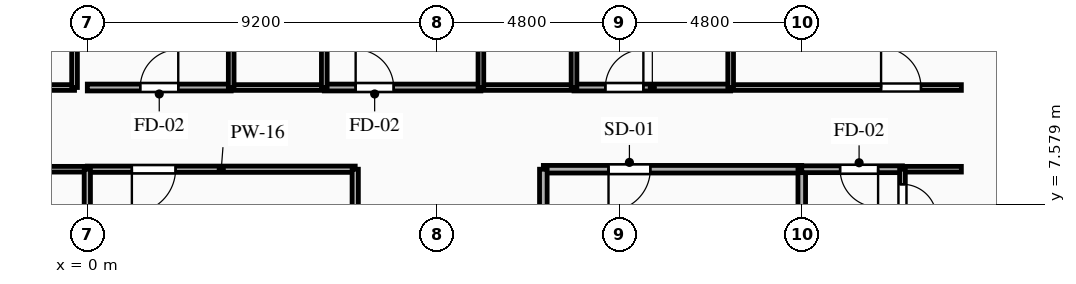
"""IFC4 building model, lengths in metres.
Left out: names, types, materials, properties, quantities, classifications, styles, units other than length and angle.
Written with IfcOpenShell. Run it as: python <this file> out.ifc"""

import sys

from ifc_helpers import new_model, si_unit, direction, frame, frame_2d, origin, place, context, subcontext, project, spatial, rectangle, extrude, element, fill, save


model = new_model("IFC4")
c1 = context("Model", 3, precision=1e-05, world=origin(), true_north=direction((0.0, 1.0)))
c2 = subcontext(c1, "Body", "Model", "MODEL_VIEW")
j1 = project(units=[si_unit("LENGTHUNIT", "METRE"), si_unit("PLANEANGLEUNIT", "RADIAN")], contexts=[c1])
p1 = place(None, origin())
s1 = spatial("IfcSite", under=j1, at=p1, CompositionType="ELEMENT")
p2 = place(p1, origin())
s2 = spatial("IfcBuilding", under=s1, at=p2, CompositionType="ELEMENT")
p3 = place(p2, frame((0.0, 0.0, 30.35)))
s3 = spatial("IfcBuildingStorey", under=s2, at=p3, CompositionType="ELEMENT", Elevation=30.35)
p4 = place(p3, frame((18.8, 8.5, 0.0), z_axis=(0.0, 0.0, 1.0), x_axis=(-1.0, 0.0, 0.0)))
e1 = element("IfcWall", 1, at=p4, inside=s3, PredefinedType="PARTITIONING", context=c2, shape_type="SweptSolid", body=[
    extrude(rectangle(XDim=6.8, YDim=0.2, at=frame_2d((3.4, 0.0))), origin(), (0.0, 0.0, 1.0), 3.035),
])
p5 = place(p4, frame((3.985, 0.0, 0.0)))
e2 = element("IfcOpeningElement", 2, at=p5, cuts=e1, PredefinedType="OPENING", context=c2, shape_type="SweptSolid", body=[
    extrude(rectangle(XDim=1.1, YDim=2.15, at=frame_2d((0.55, 1.075))), frame((0.0, 0.11, 0.0), z_axis=(0.0, -1.0, 0.0), x_axis=(1.0, 0.0, 0.0)), (0.0, 0.0, 1.0), 0.22),
])
p6 = place(p3, frame((12.0, 8.5, 0.0), z_axis=(0.0, 0.0, 1.0), x_axis=(0.0, -1.0, 0.0)))
e3 = element("IfcWall", 3, at=p6, inside=s3, PredefinedType="PARTITIONING", context=c2, shape_type="SweptSolid", body=[
    extrude(rectangle(XDim=2.9, YDim=0.2, at=frame_2d((1.45, 0.0))), origin(), (0.0, 0.0, 1.0), 3.035),
])
p7 = place(p3, frame((18.8, 5.6, 0.0), z_axis=(0.0, 0.0, 1.0), x_axis=(0.0, 1.0, 0.0)))
e4 = element("IfcWall", 4, at=p7, inside=s3, PredefinedType="PARTITIONING", context=c2, shape_type="SweptSolid", body=[
    extrude(rectangle(XDim=2.9, YDim=0.2, at=frame_2d((1.45, 0.0))), origin(), (0.0, 0.0, 1.0), 2.52),
])
p8 = place(p3, frame((-2.786, 10.65, 0.0), z_axis=(0.0, 0.0, 1.0), x_axis=(1.0, 0.0, 0.0)))
e5 = element("IfcWall", 5, at=p8, inside=s3, PredefinedType="PLUMBINGWALL", context=c2, shape_type="SweptSolid", body=[
    extrude(rectangle(XDim=2.45, YDim=0.15, at=frame_2d((1.225, 0.0))), origin(), (0.0, 0.0, 1.0), 3.035),
])
p9 = place(p3, frame((0.0, 8.5, 0.0), z_axis=(0.0, 0.0, 1.0), x_axis=(-1.0, 0.0, 0.0)))
e6 = element("IfcWall", 6, at=p9, inside=s3, PredefinedType="PARTITIONING", context=c2, shape_type="SweptSolid", body=[
    extrude(rectangle(XDim=7.05, YDim=0.15, at=frame_2d((3.525, 0.0))), origin(), (0.0, 0.0, 1.0), 3.035),
])
p10 = place(p3, frame((21.45, 8.5, 0.0), z_axis=(0.0, 0.0, 1.0), x_axis=(-1.0, 0.0, 0.0)))
e7 = element("IfcWall", 7, at=p10, inside=s3, PredefinedType="PARTITIONING", context=c2, shape_type="SweptSolid", body=[
    extrude(rectangle(XDim=2.65, YDim=0.18, at=frame_2d((1.325, 0.0))), origin(), (0.0, 0.0, 1.0), 3.035),
])
p11 = place(p10, frame((0.641, 0.0, 0.0)))
e8 = element("IfcOpeningElement", 8, at=p11, cuts=e7, PredefinedType="OPENING", context=c2, shape_type="SweptSolid", body=[
    extrude(rectangle(XDim=1.0, YDim=2.15, at=frame_2d((0.5, 1.075))), frame((0.0, 0.1, 0.0), z_axis=(0.0, -1.0, 0.0), x_axis=(1.0, 0.0, 0.0)), (0.0, 0.0, 1.0), 0.2),
])
p12 = place(p3, frame((23.0, 8.5, 0.0), z_axis=(0.0, 0.0, 1.0), x_axis=(-1.0, 0.0, 0.0)))
e9 = element("IfcWall", 9, at=p12, inside=s3, PredefinedType="PARTITIONING", context=c2, shape_type="SweptSolid", body=[
    extrude(rectangle(XDim=1.55, YDim=0.15, at=frame_2d((0.775, 0.0))), origin(), (0.0, 0.0, 1.0), 3.035),
])
p13 = place(p3, frame((0.0, 10.65, 0.0), z_axis=(0.0, 0.0, 1.0), x_axis=(1.0, 0.0, 0.0)))
e10 = element("IfcWall", 10, at=p13, inside=s3, PredefinedType="PARTITIONING", context=c2, shape_type="SweptSolid", body=[
    extrude(rectangle(XDim=3.786, YDim=0.18, at=frame_2d((1.893, 0.0))), origin(), (0.0, 0.0, 1.0), 3.035),
])
p14 = place(p13, frame((1.393, 0.0, 0.0)))
e11 = element("IfcOpeningElement", 11, at=p14, cuts=e10, PredefinedType="OPENING", context=c2, shape_type="SweptSolid", body=[
    extrude(rectangle(XDim=1.0, YDim=2.15, at=frame_2d((0.5, 1.075))), frame((0.0, 0.1, 0.0), z_axis=(0.0, -1.0, 0.0), x_axis=(1.0, 0.0, 0.0)), (0.0, 0.0, 1.0), 0.2),
])
p15 = place(p3, frame((6.236, 10.65, 0.0), z_axis=(0.0, 0.0, 1.0), x_axis=(1.0, 0.0, 0.0)))
e12 = element("IfcWall", 12, at=p15, inside=s3, PredefinedType="PARTITIONING", context=c2, shape_type="SweptSolid", body=[
    extrude(rectangle(XDim=4.121, YDim=0.18, at=frame_2d((2.061, 0.0))), origin(), (0.0, 0.0, 1.0), 3.035),
])
p16 = place(p15, frame((0.825, 0.0, 0.0)))
e13 = element("IfcOpeningElement", 13, at=p16, cuts=e12, PredefinedType="OPENING", context=c2, shape_type="SweptSolid", body=[
    extrude(rectangle(XDim=1.0, YDim=2.15, at=frame_2d((0.5, 1.075))), frame((0.0, 0.1, 0.0), z_axis=(0.0, -1.0, 0.0), x_axis=(1.0, 0.0, 0.0)), (0.0, 0.0, 1.0), 0.2),
])
p17 = place(p3, frame((3.786, 10.65, 0.0), z_axis=(0.0, 0.0, 1.0), x_axis=(1.0, 0.0, 0.0)))
e14 = element("IfcWall", 14, at=p17, inside=s3, PredefinedType="PLUMBINGWALL", context=c2, shape_type="SweptSolid", body=[
    extrude(rectangle(XDim=2.45, YDim=0.15, at=frame_2d((1.225, 0.0))), origin(), (0.0, 0.0, 1.0), 3.035),
])
p18 = place(p3, frame((12.807, 10.65, 0.0), z_axis=(0.0, 0.0, 1.0), x_axis=(1.0, 0.0, 0.0)))
e15 = element("IfcWall", 15, at=p18, inside=s3, PredefinedType="PARTITIONING", context=c2, shape_type="SweptSolid", body=[
    extrude(rectangle(XDim=4.122, YDim=0.18, at=frame_2d((2.061, 0.0))), origin(), (0.0, 0.0, 1.0), 3.035),
])
p19 = place(p18, frame((0.825, 0.0, 0.0)))
e16 = element("IfcOpeningElement", 16, at=p19, cuts=e15, PredefinedType="OPENING", context=c2, shape_type="SweptSolid", body=[
    extrude(rectangle(XDim=1.0, YDim=2.15, at=frame_2d((0.5, 1.075))), frame((0.0, 0.1, 0.0), z_axis=(0.0, -1.0, 0.0), x_axis=(1.0, 0.0, 0.0)), (0.0, 0.0, 1.0), 0.2),
])
p20 = place(p3, frame((10.357, 10.65, 0.0), z_axis=(0.0, 0.0, 1.0), x_axis=(1.0, 0.0, 0.0)))
e17 = element("IfcWall", 17, at=p20, inside=s3, PredefinedType="PLUMBINGWALL", context=c2, shape_type="SweptSolid", body=[
    extrude(rectangle(XDim=2.45, YDim=0.15, at=frame_2d((1.225, 0.0))), origin(), (0.0, 0.0, 1.0), 3.035),
])
p21 = place(p3, frame((16.929, 10.65, 0.0), z_axis=(0.0, 0.0, 1.0), x_axis=(1.0, 0.0, 0.0)))
e18 = element("IfcWall", 18, at=p21, inside=s3, PredefinedType="PARTITIONING", context=c2, shape_type="SweptSolid", body=[
    extrude(rectangle(XDim=6.071, YDim=0.15, at=frame_2d((3.036, 0.0))), origin(), (0.0, 0.0, 1.0), 3.035),
])
p22 = place(p21, frame((3.958, 0.0, 0.0)))
e19 = element("IfcOpeningElement", 19, at=p22, cuts=e18, PredefinedType="OPENING", context=c2, shape_type="SweptSolid", body=[
    extrude(rectangle(XDim=1.05, YDim=2.15, at=frame_2d((0.525, 1.075))), frame((0.0, 0.085, 0.0), z_axis=(0.0, -1.0, 0.0), x_axis=(1.0, 0.0, 0.0)), (0.0, 0.0, 1.0), 0.17),
])
p23 = place(p3, frame((7.05, 8.5, 0.0), z_axis=(0.0, 0.0, 1.0), x_axis=(-1.0, 0.0, 0.0)))
e20 = element("IfcWall", 20, at=p23, inside=s3, PredefinedType="PARTITIONING", context=c2, shape_type="SweptSolid", body=[
    extrude(rectangle(XDim=7.05, YDim=0.165, at=frame_2d((3.525, 0.0))), origin(), (0.0, 0.0, 1.0), 3.035),
])
p24 = place(p23, frame((4.728, 0.0, 0.0)))
e21 = element("IfcOpeningElement", 21, at=p24, cuts=e20, PredefinedType="OPENING", context=c2, shape_type="SweptSolid", body=[
    extrude(rectangle(XDim=1.15, YDim=2.15, at=frame_2d((0.575, 1.075))), frame((0.0, 0.093, 0.0), z_axis=(0.0, -1.0, 0.0), x_axis=(1.0, 0.0, 0.0)), (0.0, 0.0, 1.0), 0.185),
])
p25 = place(p3, frame((7.05, 1.45, 0.0), z_axis=(0.0, 0.0, 1.0), x_axis=(0.0, 1.0, 0.0)))
e22 = element("IfcWall", 22, at=p25, inside=s3, PredefinedType="PARTITIONING", context=c2, shape_type="SweptSolid", body=[
    extrude(rectangle(XDim=7.05, YDim=0.165, at=frame_2d((3.525, 0.0))), origin(), (0.0, 0.0, 1.0), 3.035),
])
p26 = place(p3, frame((21.45, 8.5, 0.0), z_axis=(0.0, 0.0, 1.0), x_axis=(0.0, -1.0, 0.0)))
e23 = element("IfcWall", 23, at=p26, inside=s3, PredefinedType="PARTITIONING", context=c2, shape_type="SweptSolid", body=[
    extrude(rectangle(XDim=1.692, YDim=0.15, at=frame_2d((0.846, 0.0))), origin(), (0.0, 0.0, 1.0), 3.035),
])
p27 = place(p26, frame((0.396, 0.0, 0.0)))
e24 = element("IfcOpeningElement", 24, at=p27, cuts=e23, PredefinedType="OPENING", context=c2, shape_type="SweptSolid", body=[
    extrude(rectangle(XDim=0.9, YDim=2.1, at=frame_2d((0.45, 1.05))), frame((0.0, 0.085, 0.0), z_axis=(0.0, -1.0, 0.0), x_axis=(1.0, 0.0, 0.0)), (0.0, 0.0, 1.0), 0.17),
])
for number, where, z_axis, x_axis in (
    (25, (-0.336, 10.65, 0.0), (0.0, 0.0, 1.0), (0.0, 1.0, 0.0)),
    (26, (3.786, 12.8, 0.0), (0.0, 0.0, 1.0), (0.0, -1.0, 0.0)),
    (27, (6.236, 10.65, 0.0), (0.0, 0.0, 1.0), (0.0, 1.0, 0.0)),
    (28, (10.357, 12.8, 0.0), (0.0, 0.0, 1.0), (0.0, -1.0, 0.0)),
    (29, (12.807, 10.65, 0.0), (0.0, 0.0, 1.0), (0.0, 1.0, 0.0)),
):
    element("IfcWall", number, at=place(p3, frame(where, z_axis=z_axis, x_axis=x_axis)), inside=s3, PredefinedType="PLUMBINGWALL", context=c2, shape_type="SweptSolid", body=[
        extrude(rectangle(XDim=2.15, YDim=0.15, at=frame_2d((1.075, 0.0))), origin(), (0.0, 0.0, 1.0), 3.035),
    ])
p28 = place(p3, frame((16.929, 19.4, 0.0), z_axis=(0.0, 0.0, 1.0), x_axis=(0.0, -1.0, 0.0)))
e30 = element("IfcWall", 30, at=p28, inside=s3, PredefinedType="PARTITIONING", context=c2, shape_type="SweptSolid", body=[
    extrude(rectangle(XDim=8.75, YDim=0.15, at=frame_2d((4.375, 0.0))), origin(), (0.0, 0.0, 1.0), 3.035),
])
p29 = place(p3, frame((0.0, 8.5, 0.0), z_axis=(0.0, 0.0, 1.0), x_axis=(0.0, -1.0, 0.0)))
e31 = element("IfcWall", 31, at=p29, inside=s3, PredefinedType="PARTITIONING", context=c2, shape_type="SweptSolid", body=[
    extrude(rectangle(XDim=7.05, YDim=0.165, at=frame_2d((3.525, 0.0))), origin(), (0.0, 0.0, 1.0), 3.035),
])
p30 = place(p5, origin())
e32 = element("IfcDoor", 32, at=p30, inside=s3, OperationType="SINGLE_SWING_RIGHT", PredefinedType="DOOR", context=c2, shape_type="SweptSolid", body=[
    extrude(rectangle(XDim=1.1, YDim=2.15, at=frame_2d((0.55, 1.075))), frame((0.0, 0.025, 0.0), z_axis=(0.0, -1.0, 0.0), x_axis=(1.0, 0.0, 0.0)), (0.0, 0.0, 1.0), 0.05),
])
fill(e2, e32)
p31 = place(p11, origin())
e33 = element("IfcDoor", 33, at=p31, inside=s3, OperationType="SINGLE_SWING_LEFT", PredefinedType="DOOR", context=c2, shape_type="SweptSolid", body=[
    extrude(rectangle(XDim=1.0, YDim=2.15, at=frame_2d((0.5, 1.075))), frame((0.0, 0.025, 0.0), z_axis=(0.0, -1.0, 0.0), x_axis=(1.0, 0.0, 0.0)), (0.0, 0.0, 1.0), 0.05),
])
fill(e8, e33)
p32 = place(p14, origin())
e34 = element("IfcDoor", 34, at=p32, inside=s3, OperationType="SINGLE_SWING_RIGHT", PredefinedType="DOOR", context=c2, shape_type="SweptSolid", body=[
    extrude(rectangle(XDim=1.0, YDim=2.15, at=frame_2d((0.5, 1.075))), frame((0.0, 0.025, 0.0), z_axis=(0.0, -1.0, 0.0), x_axis=(1.0, 0.0, 0.0)), (0.0, 0.0, 1.0), 0.05),
])
fill(e11, e34)
p33 = place(p16, origin())
e35 = element("IfcDoor", 35, at=p33, inside=s3, OperationType="SINGLE_SWING_LEFT", PredefinedType="DOOR", context=c2, shape_type="SweptSolid", body=[
    extrude(rectangle(XDim=1.0, YDim=2.15, at=frame_2d((0.5, 1.075))), frame((0.0, 0.025, 0.0), z_axis=(0.0, -1.0, 0.0), x_axis=(1.0, 0.0, 0.0)), (0.0, 0.0, 1.0), 0.05),
])
fill(e13, e35)
p34 = place(p19, origin())
e36 = element("IfcDoor", 36, at=p34, inside=s3, OperationType="SINGLE_SWING_RIGHT", PredefinedType="DOOR", context=c2, shape_type="SweptSolid", body=[
    extrude(rectangle(XDim=1.0, YDim=2.15, at=frame_2d((0.5, 1.075))), frame((0.0, 0.025, 0.0), z_axis=(0.0, -1.0, 0.0), x_axis=(1.0, 0.0, 0.0)), (0.0, 0.0, 1.0), 0.05),
])
fill(e16, e36)
p35 = place(p22, origin())
e37 = element("IfcDoor", 37, at=p35, inside=s3, OperationType="SINGLE_SWING_LEFT", PredefinedType="DOOR", context=c2, shape_type="SweptSolid", body=[
    extrude(rectangle(XDim=1.05, YDim=2.15, at=frame_2d((0.525, 1.075))), frame((0.0, 0.025, 0.0), z_axis=(0.0, -1.0, 0.0), x_axis=(1.0, 0.0, 0.0)), (0.0, 0.0, 1.0), 0.05),
])
fill(e19, e37)
p36 = place(p24, origin())
e38 = element("IfcDoor", 38, at=p36, inside=s3, OperationType="SINGLE_SWING_RIGHT", PredefinedType="DOOR", context=c2, shape_type="SweptSolid", body=[
    extrude(rectangle(XDim=1.15, YDim=2.15, at=frame_2d((0.575, 1.075))), frame((0.0, 0.025, 0.0), z_axis=(0.0, -1.0, 0.0), x_axis=(1.0, 0.0, 0.0)), (0.0, 0.0, 1.0), 0.05),
])
fill(e21, e38)
p37 = place(p27, origin())
e39 = element("IfcDoor", 39, at=p37, inside=s3, OperationType="SINGLE_SWING_RIGHT", PredefinedType="DOOR", context=c2, shape_type="SweptSolid", body=[
    extrude(rectangle(XDim=0.9, YDim=2.1, at=frame_2d((0.45, 1.05))), frame((0.0, 0.025, 0.0), z_axis=(0.0, -1.0, 0.0), x_axis=(1.0, 0.0, 0.0)), (0.0, 0.0, 1.0), 0.05),
])
fill(e24, e39)
save(model, sys.argv[1])
